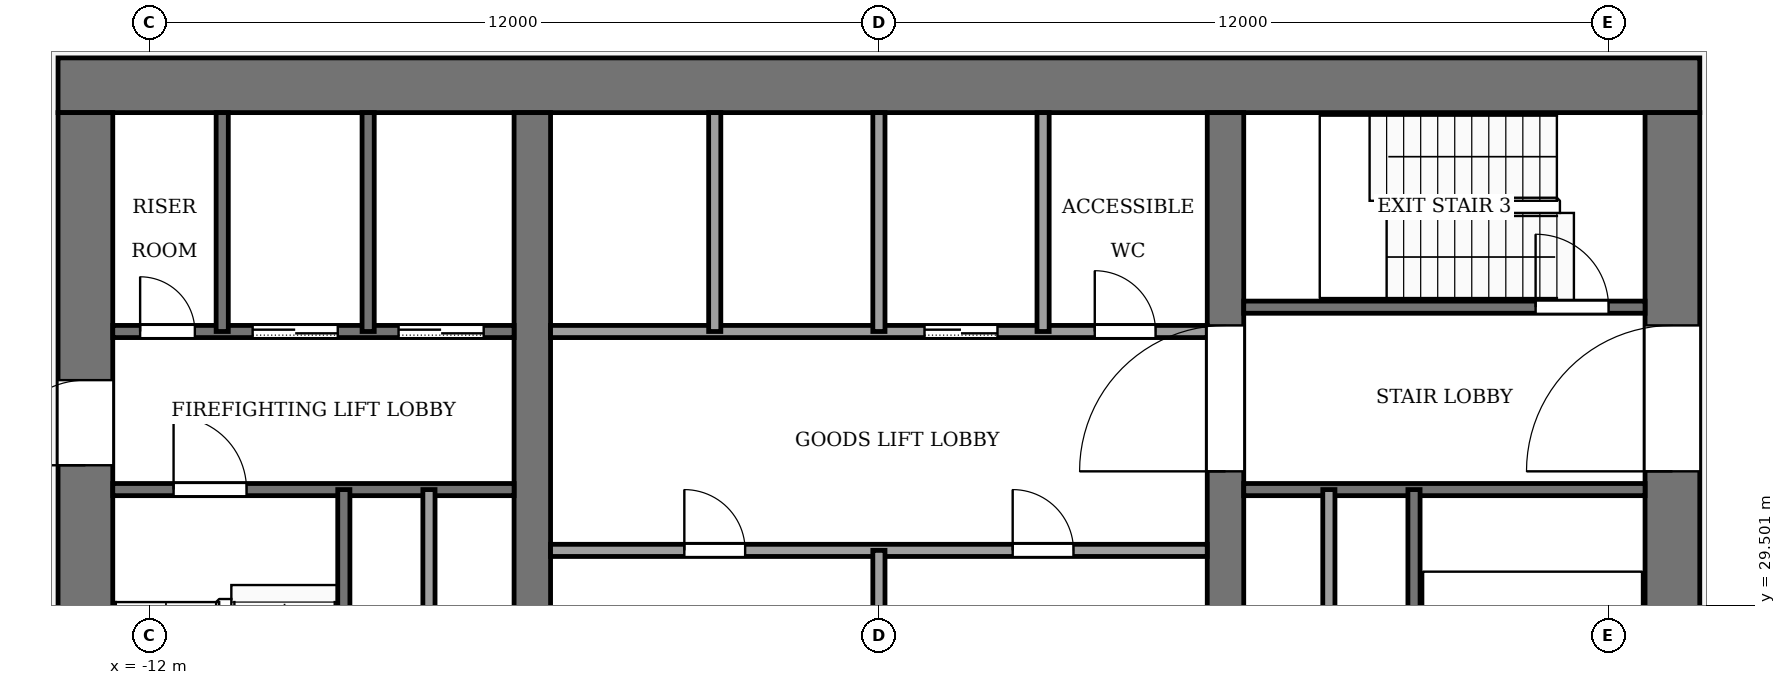
"""IFC4 building model, lengths in metres.
Left out: names, types, materials, properties, quantities, classifications, styles, units other than length and angle.
Written with IfcOpenShell. Run it as: python <this file> out.ifc"""

import sys

from ifc_helpers import new_model, si_unit, direction, frame, frame_2d, origin, place, context, subcontext, project, spatial, rectangle, extrude, element, fill, save


model = new_model("IFC4")
c1 = context("Model", 3, precision=1e-05, world=origin(), true_north=direction((0.0, 1.0)))
c2 = subcontext(c1, "Body", "Model", "MODEL_VIEW")
j1 = project(units=[si_unit("LENGTHUNIT", "METRE"), si_unit("PLANEANGLEUNIT", "RADIAN")], contexts=[c1])
p1 = place(None, origin())
s1 = spatial("IfcSite", under=j1, at=p1, CompositionType="ELEMENT")
p2 = place(p1, origin())
s2 = spatial("IfcBuilding", under=s1, at=p2, CompositionType="ELEMENT")
p3 = place(p2, frame((0.0, 0.0, 222.0)))
s3 = spatial("IfcBuildingStorey", under=s2, at=p3, CompositionType="ELEMENT", Elevation=222.0)
p4 = place(p3, frame((-13.5, 38.05, -0.13), z_axis=(0.0, 0.0, 1.0), x_axis=(1.0, 0.0, 0.0)))
e1 = element("IfcWall", 1, at=p4, inside=s3, PredefinedType="SHEAR", context=c2, shape_type="SweptSolid", body=[
    extrude(rectangle(XDim=27.0, YDim=0.9, at=frame_2d((13.5, 0.0))), origin(), (0.0, 0.0, 1.0), 3.88),
])
p5 = place(p3, frame((-13.05, 18.4, -0.13), z_axis=(0.0, 0.0, 1.0), x_axis=(0.0, 1.0, 0.0)))
e2 = element("IfcWall", 2, at=p5, inside=s3, PredefinedType="SHEAR", context=c2, shape_type="SweptSolid", body=[
    extrude(rectangle(XDim=19.2, YDim=0.9, at=frame_2d((9.6, 0.0))), origin(), (0.0, 0.0, 1.0), 3.88),
])
p6 = place(p5, frame((2.8, 0.0, 0.13)))
e3 = element("IfcOpeningElement", 3, at=p6, cuts=e2, PredefinedType="OPENING", context=c2, shape_type="SweptSolid", body=[
    extrude(rectangle(XDim=2.4, YDim=2.4, at=frame_2d((1.2, 1.2))), frame((0.0, 0.46, 0.0), z_axis=(0.0, -1.0, 0.0), x_axis=(1.0, 0.0, 0.0)), (0.0, 0.0, 1.0), 0.92),
])
p7 = place(p5, frame((13.4, 0.0, 0.13)))
e4 = element("IfcOpeningElement", 4, at=p7, cuts=e2, PredefinedType="OPENING", context=c2, shape_type="SweptSolid", body=[
    extrude(rectangle(XDim=1.4, YDim=2.2, at=frame_2d((0.7, 1.1))), frame((0.0, 0.46, 0.0), z_axis=(0.0, -1.0, 0.0), x_axis=(1.0, 0.0, 0.0)), (0.0, 0.0, 1.0), 0.92),
])
p8 = place(p3, frame((13.05, 18.4, -0.13), z_axis=(0.0, 0.0, 1.0), x_axis=(0.0, 1.0, 0.0)))
e5 = element("IfcWall", 5, at=p8, inside=s3, PredefinedType="SHEAR", context=c2, shape_type="SweptSolid", body=[
    extrude(rectangle(XDim=19.2, YDim=0.9, at=frame_2d((9.6, 0.0))), origin(), (0.0, 0.0, 1.0), 3.88),
])
p9 = place(p8, frame((2.8, 0.0, 0.13)))
e6 = element("IfcOpeningElement", 6, at=p9, cuts=e5, PredefinedType="OPENING", context=c2, shape_type="SweptSolid", body=[
    extrude(rectangle(XDim=2.4, YDim=2.4, at=frame_2d((1.2, 1.2))), frame((0.0, 0.46, 0.0), z_axis=(0.0, -1.0, 0.0), x_axis=(1.0, 0.0, 0.0)), (0.0, 0.0, 1.0), 0.92),
])
p10 = place(p8, frame((13.3, 0.0, 0.13)))
e7 = element("IfcOpeningElement", 7, at=p10, cuts=e5, PredefinedType="OPENING", context=c2, shape_type="SweptSolid", body=[
    extrude(rectangle(XDim=2.4, YDim=2.4, at=frame_2d((1.2, 1.2))), frame((0.0, 0.46, 0.0), z_axis=(0.0, -1.0, 0.0), x_axis=(1.0, 0.0, 0.0)), (0.0, 0.0, 1.0), 0.92),
])
p11 = place(p3, frame((-5.7, 18.4, -0.13), z_axis=(0.0, 0.0, 1.0), x_axis=(0.0, 1.0, 0.0)))
e8 = element("IfcWall", 8, at=p11, inside=s3, PredefinedType="SHEAR", context=c2, shape_type="SweptSolid", body=[
    extrude(rectangle(XDim=19.2, YDim=0.6, at=frame_2d((9.6, 0.0))), origin(), (0.0, 0.0, 1.0), 3.88),
])
p12 = place(p11, frame((8.35, 0.0, 0.13)))
e9 = element("IfcOpeningElement", 9, at=p12, cuts=e8, PredefinedType="OPENING", context=c2, shape_type="SweptSolid", body=[
    extrude(rectangle(XDim=0.9, YDim=2.1, at=frame_2d((0.45, 1.05))), frame((0.0, 0.31, 0.0), z_axis=(0.0, -1.0, 0.0), x_axis=(1.0, 0.0, 0.0)), (0.0, 0.0, 1.0), 0.62),
])
p13 = place(p3, frame((5.7, 18.4, -0.13), z_axis=(0.0, 0.0, 1.0), x_axis=(0.0, 1.0, 0.0)))
e10 = element("IfcWall", 10, at=p13, inside=s3, PredefinedType="SHEAR", context=c2, shape_type="SweptSolid", body=[
    extrude(rectangle(XDim=19.2, YDim=0.6, at=frame_2d((9.6, 0.0))), origin(), (0.0, 0.0, 1.0), 3.88),
])
p14 = place(p13, frame((8.35, 0.0, 0.13)))
e11 = element("IfcOpeningElement", 11, at=p14, cuts=e10, PredefinedType="OPENING", context=c2, shape_type="SweptSolid", body=[
    extrude(rectangle(XDim=0.9, YDim=2.1, at=frame_2d((0.45, 1.05))), frame((0.0, 0.31, 0.0), z_axis=(0.0, -1.0, 0.0), x_axis=(1.0, 0.0, 0.0)), (0.0, 0.0, 1.0), 0.62),
])
p15 = place(p13, frame((13.3, 0.0, 0.13)))
e12 = element("IfcOpeningElement", 12, at=p15, cuts=e10, PredefinedType="OPENING", context=c2, shape_type="SweptSolid", body=[
    extrude(rectangle(XDim=2.4, YDim=2.4, at=frame_2d((1.2, 1.2))), frame((0.0, 0.31, 0.0), z_axis=(0.0, -1.0, 0.0), x_axis=(1.0, 0.0, 0.0)), (0.0, 0.0, 1.0), 0.62),
])
p16 = place(p3, frame((-5.4, 30.4, 0.0), z_axis=(0.0, 0.0, 1.0), x_axis=(1.0, 0.0, 0.0)))
e13 = element("IfcWall", 13, at=p16, inside=s3, PredefinedType="PARTITIONING", context=c2, shape_type="SweptSolid", body=[
    extrude(rectangle(XDim=10.8, YDim=0.2, at=frame_2d((5.4, 0.0))), origin(), (0.0, 0.0, 1.0), 3.75),
])
p17 = place(p16, frame((2.2, 0.0, 0.0)))
e14 = element("IfcOpeningElement", 14, at=p17, cuts=e13, PredefinedType="OPENING", context=c2, shape_type="SweptSolid", body=[
    extrude(rectangle(XDim=1.0, YDim=2.1, at=frame_2d((0.5, 1.05))), frame((0.0, 0.11, 0.0), z_axis=(0.0, -1.0, 0.0), x_axis=(1.0, 0.0, 0.0)), (0.0, 0.0, 1.0), 0.22),
])
p18 = place(p16, frame((7.6, 0.0, 0.0)))
e15 = element("IfcOpeningElement", 15, at=p18, cuts=e13, PredefinedType="OPENING", context=c2, shape_type="SweptSolid", body=[
    extrude(rectangle(XDim=1.0, YDim=2.1, at=frame_2d((0.5, 1.05))), frame((0.0, 0.11, 0.0), z_axis=(0.0, -1.0, 0.0), x_axis=(1.0, 0.0, 0.0)), (0.0, 0.0, 1.0), 0.22),
])
p19 = place(p3, frame((-12.6, 31.4, 0.0), z_axis=(0.0, 0.0, 1.0), x_axis=(1.0, 0.0, 0.0)))
e16 = element("IfcWall", 16, at=p19, inside=s3, PredefinedType="PARTITIONING", context=c2, shape_type="SweptSolid", body=[
    extrude(rectangle(XDim=6.6, YDim=0.2, at=frame_2d((3.3, 0.0))), origin(), (0.0, 0.0, 1.0), 3.75),
])
p20 = place(p19, frame((1.0, 0.0, 0.0)))
e17 = element("IfcOpeningElement", 17, at=p20, cuts=e16, PredefinedType="OPENING", context=c2, shape_type="SweptSolid", body=[
    extrude(rectangle(XDim=1.2, YDim=2.2, at=frame_2d((0.6, 1.1))), frame((0.0, 0.11, 0.0), z_axis=(0.0, -1.0, 0.0), x_axis=(1.0, 0.0, 0.0)), (0.0, 0.0, 1.0), 0.22),
])
p21 = place(p3, frame((6.0, 31.4, 0.0), z_axis=(0.0, 0.0, 1.0), x_axis=(1.0, 0.0, 0.0)))
e18 = element("IfcWall", 18, at=p21, inside=s3, PredefinedType="PARTITIONING", context=c2, shape_type="SweptSolid", body=[
    extrude(rectangle(XDim=6.6, YDim=0.2, at=frame_2d((3.3, 0.0))), origin(), (0.0, 0.0, 1.0), 3.75),
])
p22 = place(p3, frame((-12.6, 34.0, 0.0), z_axis=(0.0, 0.0, 1.0), x_axis=(1.0, 0.0, 0.0)))
e19 = element("IfcWall", 19, at=p22, inside=s3, PredefinedType="PARTITIONING", context=c2, shape_type="SweptSolid", body=[
    extrude(rectangle(XDim=6.6, YDim=0.2, at=frame_2d((3.3, 0.0))), origin(), (0.0, 0.0, 1.0), 3.75),
])
p23 = place(p22, frame((4.7, 0.0, 0.0)))
e20 = element("IfcOpeningElement", 20, at=p23, cuts=e19, PredefinedType="OPENING", context=c2, shape_type="SweptSolid", body=[
    extrude(rectangle(XDim=1.4, YDim=2.2, at=frame_2d((0.7, 1.1))), frame((0.0, 0.11, 0.0), z_axis=(0.0, -1.0, 0.0), x_axis=(1.0, 0.0, 0.0)), (0.0, 0.0, 1.0), 0.22),
])
p24 = place(p22, frame((2.3, 0.0, 0.0)))
e21 = element("IfcOpeningElement", 21, at=p24, cuts=e19, PredefinedType="OPENING", context=c2, shape_type="SweptSolid", body=[
    extrude(rectangle(XDim=1.4, YDim=2.2, at=frame_2d((0.7, 1.1))), frame((0.0, 0.11, 0.0), z_axis=(0.0, -1.0, 0.0), x_axis=(1.0, 0.0, 0.0)), (0.0, 0.0, 1.0), 0.22),
])
p25 = place(p22, frame((0.45, 0.0, 0.0)))
e22 = element("IfcOpeningElement", 22, at=p25, cuts=e19, PredefinedType="OPENING", context=c2, shape_type="SweptSolid", body=[
    extrude(rectangle(XDim=0.9, YDim=2.1, at=frame_2d((0.45, 1.05))), frame((0.0, 0.11, 0.0), z_axis=(0.0, -1.0, 0.0), x_axis=(1.0, 0.0, 0.0)), (0.0, 0.0, 1.0), 0.22),
])
p26 = place(p3, frame((-5.4, 34.0, 0.0), z_axis=(0.0, 0.0, 1.0), x_axis=(1.0, 0.0, 0.0)))
e23 = element("IfcWall", 23, at=p26, inside=s3, PredefinedType="PARTITIONING", context=c2, shape_type="SweptSolid", body=[
    extrude(rectangle(XDim=10.8, YDim=0.2, at=frame_2d((5.4, 0.0))), origin(), (0.0, 0.0, 1.0), 3.75),
])
p27 = place(p26, frame((6.15, 0.0, 0.0)))
e24 = element("IfcOpeningElement", 24, at=p27, cuts=e23, PredefinedType="OPENING", context=c2, shape_type="SweptSolid", body=[
    extrude(rectangle(XDim=1.2, YDim=2.2, at=frame_2d((0.6, 1.1))), frame((0.0, 0.11, 0.0), z_axis=(0.0, -1.0, 0.0), x_axis=(1.0, 0.0, 0.0)), (0.0, 0.0, 1.0), 0.22),
])
p28 = place(p26, frame((8.95, 0.0, 0.0)))
e25 = element("IfcOpeningElement", 25, at=p28, cuts=e23, PredefinedType="OPENING", context=c2, shape_type="SweptSolid", body=[
    extrude(rectangle(XDim=1.0, YDim=2.1, at=frame_2d((0.5, 1.05))), frame((0.0, 0.11, 0.0), z_axis=(0.0, -1.0, 0.0), x_axis=(1.0, 0.0, 0.0)), (0.0, 0.0, 1.0), 0.22),
])
p29 = place(p3, frame((6.0, 34.4, 0.0), z_axis=(0.0, 0.0, 1.0), x_axis=(1.0, 0.0, 0.0)))
e26 = element("IfcWall", 26, at=p29, inside=s3, PredefinedType="PARTITIONING", context=c2, shape_type="SweptSolid", body=[
    extrude(rectangle(XDim=6.6, YDim=0.2, at=frame_2d((3.3, 0.0))), origin(), (0.0, 0.0, 1.0), 3.75),
])
p30 = place(p29, frame((4.8, 0.0, 0.0)))
e27 = element("IfcOpeningElement", 27, at=p30, cuts=e26, PredefinedType="OPENING", context=c2, shape_type="SweptSolid", body=[
    extrude(rectangle(XDim=1.2, YDim=2.2, at=frame_2d((0.6, 1.1))), frame((0.0, 0.11, 0.0), z_axis=(0.0, -1.0, 0.0), x_axis=(1.0, 0.0, 0.0)), (0.0, 0.0, 1.0), 0.22),
])
p31 = place(p3, frame((-10.8, 34.0, 0.0), z_axis=(0.0, 0.0, 1.0), x_axis=(0.0, 1.0, 0.0)))
e28 = element("IfcWall", 28, at=p31, inside=s3, PredefinedType="PARTITIONING", context=c2, shape_type="SweptSolid", body=[
    extrude(rectangle(XDim=3.6, YDim=0.2, at=frame_2d((1.8, 0.0))), origin(), (0.0, 0.0, 1.0), 3.75),
])
p32 = place(p3, frame((-8.8, 24.0, 0.0), z_axis=(0.0, 0.0, 1.0), x_axis=(0.0, 1.0, 0.0)))
e29 = element("IfcWall", 29, at=p32, inside=s3, PredefinedType="PARTITIONING", context=c2, shape_type="SweptSolid", body=[
    extrude(rectangle(XDim=7.4, YDim=0.2, at=frame_2d((3.7, 0.0))), origin(), (0.0, 0.0, 1.0), 3.75),
])
p33 = place(p3, frame((-8.4, 34.0, 0.0), z_axis=(0.0, 0.0, 1.0), x_axis=(0.0, 1.0, 0.0)))
e30 = element("IfcWall", 30, at=p33, inside=s3, PredefinedType="PARTITIONING", context=c2, shape_type="SweptSolid", body=[
    extrude(rectangle(XDim=3.6, YDim=0.2, at=frame_2d((1.8, 0.0))), origin(), (0.0, 0.0, 1.0), 3.75),
])
p34 = place(p3, frame((-7.4, 24.0, 0.0), z_axis=(0.0, 0.0, 1.0), x_axis=(0.0, 1.0, 0.0)))
e31 = element("IfcWall", 31, at=p34, inside=s3, PredefinedType="PARTITIONING", context=c2, shape_type="SweptSolid", body=[
    extrude(rectangle(XDim=7.4, YDim=0.2, at=frame_2d((3.7, 0.0))), origin(), (0.0, 0.0, 1.0), 3.75),
])
p35 = place(p3, frame((-2.7, 34.0, 0.0), z_axis=(0.0, 0.0, 1.0), x_axis=(0.0, 1.0, 0.0)))
e32 = element("IfcWall", 32, at=p35, inside=s3, PredefinedType="PARTITIONING", context=c2, shape_type="SweptSolid", body=[
    extrude(rectangle(XDim=3.6, YDim=0.2, at=frame_2d((1.8, 0.0))), origin(), (0.0, 0.0, 1.0), 3.75),
])
p36 = place(p3, frame((0.0, 24.0, 0.0), z_axis=(0.0, 0.0, 1.0), x_axis=(0.0, 1.0, 0.0)))
e33 = element("IfcWall", 33, at=p36, inside=s3, PredefinedType="PARTITIONING", context=c2, shape_type="SweptSolid", body=[
    extrude(rectangle(XDim=6.4, YDim=0.2, at=frame_2d((3.2, 0.0))), origin(), (0.0, 0.0, 1.0), 3.75),
])
for number, where, z_axis, x_axis in (
    (34, (0.0, 34.0, 0.0), (0.0, 0.0, 1.0), (0.0, 1.0, 0.0)),
    (35, (2.7, 34.0, 0.0), (0.0, 0.0, 1.0), (0.0, 1.0, 0.0)),
):
    element("IfcWall", number, at=place(p3, frame(where, z_axis=z_axis, x_axis=x_axis)), inside=s3, PredefinedType="PARTITIONING", context=c2, shape_type="SweptSolid", body=[
        extrude(rectangle(XDim=3.6, YDim=0.2, at=frame_2d((1.8, 0.0))), origin(), (0.0, 0.0, 1.0), 3.75),
    ])
for number, where, z_axis, x_axis in (
    (36, (7.4, 24.0, 0.0), (0.0, 0.0, 1.0), (0.0, 1.0, 0.0)),
    (37, (8.8, 24.0, 0.0), (0.0, 0.0, 1.0), (0.0, 1.0, 0.0)),
):
    element("IfcWall", number, at=place(p3, frame(where, z_axis=z_axis, x_axis=x_axis)), inside=s3, PredefinedType="PARTITIONING", context=c2, shape_type="SweptSolid", body=[
        extrude(rectangle(XDim=7.4, YDim=0.2, at=frame_2d((3.7, 0.0))), origin(), (0.0, 0.0, 1.0), 3.75),
    ])
p37 = place(p27, origin())
e38 = element("IfcDoor", 38, at=p37, inside=s3, OperationType="SLIDING_TO_LEFT", PredefinedType="DOOR", context=c2, shape_type="SweptSolid", body=[
    extrude(rectangle(XDim=1.2, YDim=2.2, at=frame_2d((0.6, 1.1))), frame((0.0, 0.025, 0.0), z_axis=(0.0, -1.0, 0.0), x_axis=(1.0, 0.0, 0.0)), (0.0, 0.0, 1.0), 0.05),
])
fill(e24, e38)
p38 = place(p23, origin())
e39 = element("IfcDoor", 39, at=p38, inside=s3, OperationType="SLIDING_TO_LEFT", PredefinedType="DOOR", context=c2, shape_type="SweptSolid", body=[
    extrude(rectangle(XDim=1.4, YDim=2.2, at=frame_2d((0.7, 1.1))), frame((0.0, 0.025, 0.0), z_axis=(0.0, -1.0, 0.0), x_axis=(1.0, 0.0, 0.0)), (0.0, 0.0, 1.0), 0.05),
])
fill(e20, e39)
p39 = place(p24, origin())
e40 = element("IfcDoor", 40, at=p39, inside=s3, OperationType="SLIDING_TO_LEFT", PredefinedType="DOOR", context=c2, shape_type="SweptSolid", body=[
    extrude(rectangle(XDim=1.4, YDim=2.2, at=frame_2d((0.7, 1.1))), frame((0.0, 0.025, 0.0), z_axis=(0.0, -1.0, 0.0), x_axis=(1.0, 0.0, 0.0)), (0.0, 0.0, 1.0), 0.05),
])
fill(e21, e40)
p40 = place(p25, origin())
e41 = element("IfcDoor", 41, at=p40, inside=s3, OperationType="SINGLE_SWING_RIGHT", PredefinedType="DOOR", context=c2, shape_type="SweptSolid", body=[
    extrude(rectangle(XDim=0.9, YDim=2.1, at=frame_2d((0.45, 1.05))), frame((0.0, 0.025, 0.0), z_axis=(0.0, -1.0, 0.0), x_axis=(1.0, 0.0, 0.0)), (0.0, 0.0, 1.0), 0.05),
])
fill(e22, e41)
p41 = place(p17, origin())
e42 = element("IfcDoor", 42, at=p41, inside=s3, OperationType="SINGLE_SWING_LEFT", PredefinedType="DOOR", context=c2, shape_type="SweptSolid", body=[
    extrude(rectangle(XDim=1.0, YDim=2.1, at=frame_2d((0.5, 1.05))), frame((0.0, 0.025, 0.0), z_axis=(0.0, -1.0, 0.0), x_axis=(1.0, 0.0, 0.0)), (0.0, 0.0, 1.0), 0.05),
])
fill(e14, e42)
p42 = place(p18, origin())
e43 = element("IfcDoor", 43, at=p42, inside=s3, OperationType="SINGLE_SWING_RIGHT", PredefinedType="DOOR", context=c2, shape_type="SweptSolid", body=[
    extrude(rectangle(XDim=1.0, YDim=2.1, at=frame_2d((0.5, 1.05))), frame((0.0, 0.025, 0.0), z_axis=(0.0, -1.0, 0.0), x_axis=(1.0, 0.0, 0.0)), (0.0, 0.0, 1.0), 0.05),
])
fill(e15, e43)
p43 = place(p28, origin())
e44 = element("IfcDoor", 44, at=p43, inside=s3, OperationType="SINGLE_SWING_LEFT", PredefinedType="DOOR", context=c2, shape_type="SweptSolid", body=[
    extrude(rectangle(XDim=1.0, YDim=2.1, at=frame_2d((0.5, 1.05))), frame((0.0, 0.025, 0.0), z_axis=(0.0, -1.0, 0.0), x_axis=(1.0, 0.0, 0.0)), (0.0, 0.0, 1.0), 0.05),
])
fill(e25, e44)
p44 = place(p20, origin())
e45 = element("IfcDoor", 45, at=p44, inside=s3, OperationType="SINGLE_SWING_RIGHT", PredefinedType="DOOR", context=c2, shape_type="SweptSolid", body=[
    extrude(rectangle(XDim=1.2, YDim=2.2, at=frame_2d((0.6, 1.1))), frame((0.0, 0.025, 0.0), z_axis=(0.0, -1.0, 0.0), x_axis=(1.0, 0.0, 0.0)), (0.0, 0.0, 1.0), 0.05),
])
fill(e17, e45)
p45 = place(p30, origin())
e46 = element("IfcDoor", 46, at=p45, inside=s3, OperationType="SINGLE_SWING_RIGHT", PredefinedType="DOOR", context=c2, shape_type="SweptSolid", body=[
    extrude(rectangle(XDim=1.2, YDim=2.2, at=frame_2d((0.6, 1.1))), frame((0.0, 0.025, 0.0), z_axis=(0.0, -1.0, 0.0), x_axis=(1.0, 0.0, 0.0)), (0.0, 0.0, 1.0), 0.05),
])
fill(e27, e46)
p46 = place(p15, origin())
e47 = element("IfcDoor", 47, at=p46, inside=s3, OperationType="DOUBLE_DOOR_SINGLE_SWING", PredefinedType="DOOR", context=c2, shape_type="SweptSolid", body=[
    extrude(rectangle(XDim=2.4, YDim=2.4, at=frame_2d((1.2, 1.2))), frame((0.0, 0.025, 0.0), z_axis=(0.0, -1.0, 0.0), x_axis=(1.0, 0.0, 0.0)), (0.0, 0.0, 1.0), 0.05),
])
fill(e12, e47)
p47 = place(p10, origin())
e48 = element("IfcDoor", 48, at=p47, inside=s3, OperationType="DOUBLE_DOOR_SINGLE_SWING", PredefinedType="DOOR", context=c2, shape_type="SweptSolid", body=[
    extrude(rectangle(XDim=2.4, YDim=2.4, at=frame_2d((1.2, 1.2))), frame((0.0, 0.025, 0.0), z_axis=(0.0, -1.0, 0.0), x_axis=(1.0, 0.0, 0.0)), (0.0, 0.0, 1.0), 0.05),
])
fill(e7, e48)
p48 = place(p7, origin())
e49 = element("IfcDoor", 49, at=p48, inside=s3, OperationType="SINGLE_SWING_RIGHT", PredefinedType="DOOR", context=c2, shape_type="SweptSolid", body=[
    extrude(rectangle(XDim=1.4, YDim=2.2, at=frame_2d((0.7, 1.1))), frame((0.0, 0.025, 0.0), z_axis=(0.0, -1.0, 0.0), x_axis=(1.0, 0.0, 0.0)), (0.0, 0.0, 1.0), 0.05),
])
fill(e4, e49)
save(model, sys.argv[1])
